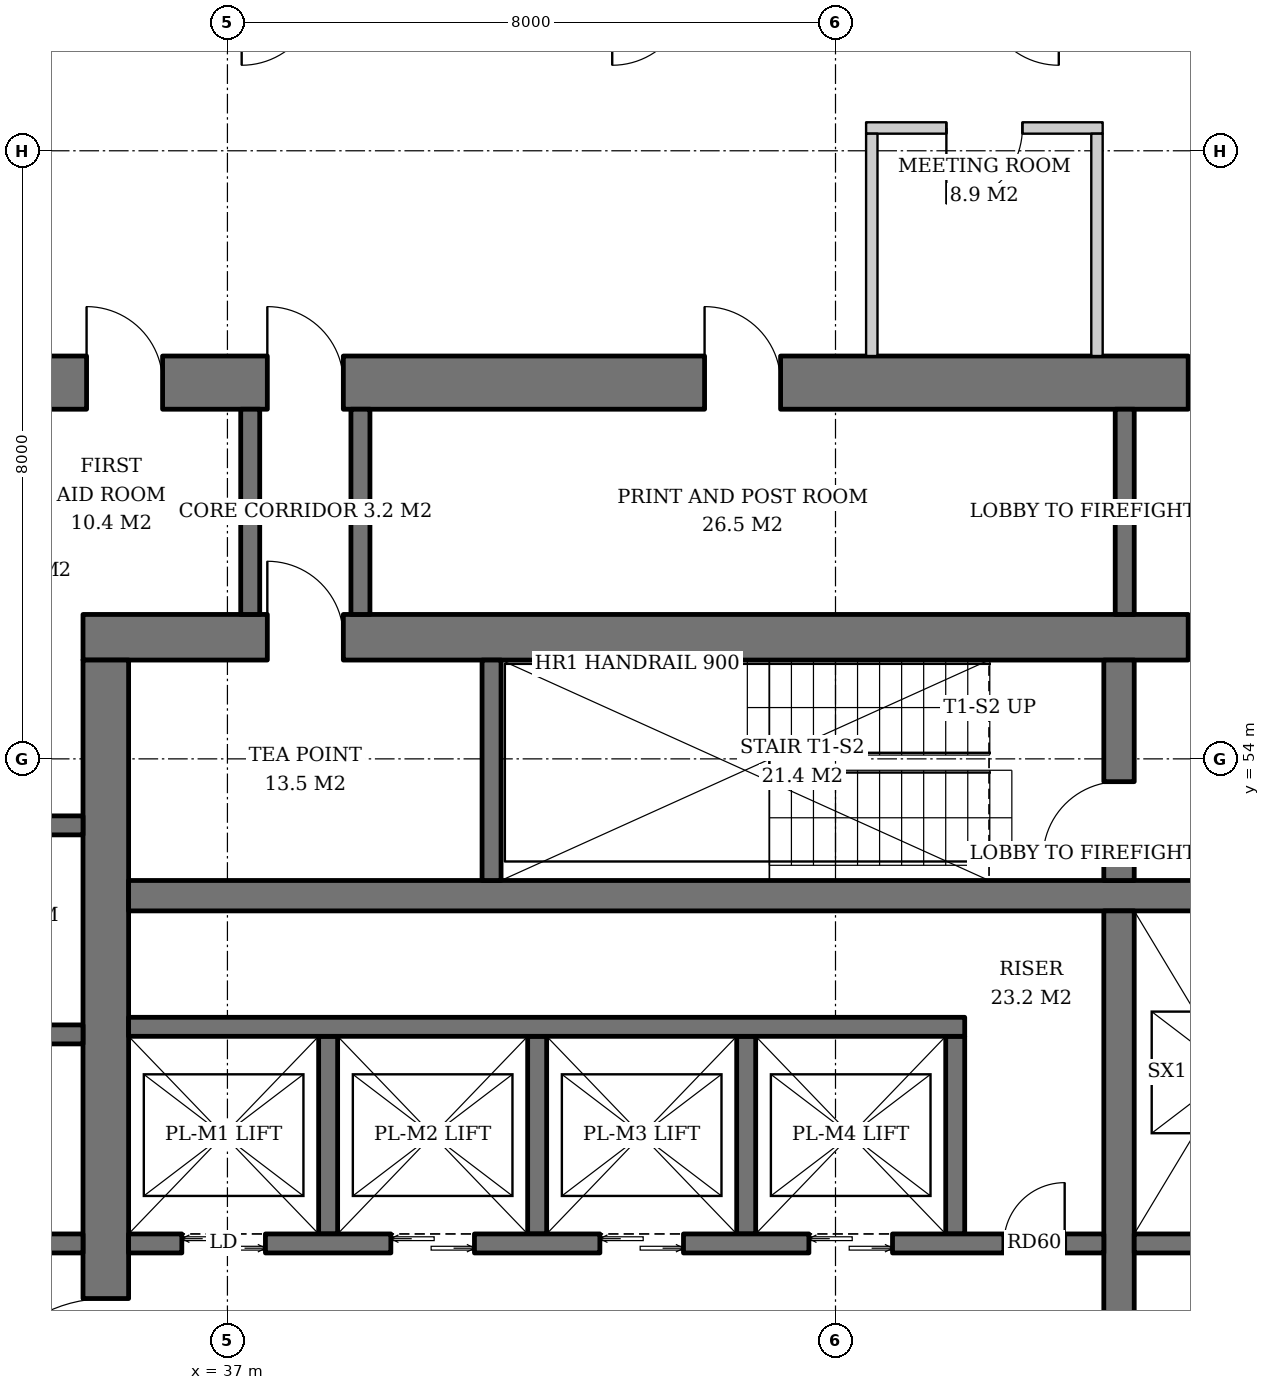
"""IFC4 building model, lengths in metres.
Left out: names, types, materials, properties, quantities, classifications, styles, units other than length and angle.
Written with IfcOpenShell. Run it as: python <this file> out.ifc"""

import sys

from ifc_helpers import new_model, si_unit, direction, frame, frame_2d, origin, place, context, subcontext, project, spatial, rectangle, extrude, element, fill, save


model = new_model("IFC4")
c1 = context("Model", 3, precision=1e-05, world=origin(), true_north=direction((0.0, 1.0)))
c2 = subcontext(c1, "Body", "Model", "MODEL_VIEW")
j1 = project(units=[si_unit("LENGTHUNIT", "METRE"), si_unit("PLANEANGLEUNIT", "RADIAN")], contexts=[c1])
p1 = place(None, origin())
s1 = spatial("IfcSite", under=j1, at=p1, CompositionType="ELEMENT")
p2 = place(p1, origin())
s2 = spatial("IfcBuilding", under=s1, at=p2, CompositionType="ELEMENT")
p3 = place(p2, frame((0.0, 0.0, 100.8)))
s3 = spatial("IfcBuildingStorey", under=s2, at=p3, CompositionType="ELEMENT", Elevation=100.8)
p4 = place(p3, frame((35.1, 55.6, 0.0), z_axis=(0.0, 0.0, 1.0), x_axis=(1.0, 0.0, 0.0)))
e1 = element("IfcWall", 1, at=p4, inside=s3, PredefinedType="SHEAR", context=c2, shape_type="SweptSolid", body=[
    extrude(rectangle(XDim=19.8, YDim=0.6, at=frame_2d((9.9, 0.0))), origin(), (0.0, 0.0, 1.0), 3.8),
])
p5 = place(p4, frame((14.54, 0.0, 0.0)))
e2 = element("IfcOpeningElement", 2, at=p5, cuts=e1, PredefinedType="OPENING", context=c2, shape_type="SweptSolid", body=[
    extrude(rectangle(XDim=1.0, YDim=2.1, at=frame_2d((0.5, 1.05))), frame((0.0, 0.31, 0.0), z_axis=(0.0, -1.0, 0.0), x_axis=(1.0, 0.0, 0.0)), (0.0, 0.0, 1.0), 0.62),
])
p6 = place(p4, frame((2.425, 0.0, 0.0)))
e3 = element("IfcOpeningElement", 3, at=p6, cuts=e1, PredefinedType="OPENING", context=c2, shape_type="SweptSolid", body=[
    extrude(rectangle(XDim=1.0, YDim=2.1, at=frame_2d((0.5, 1.05))), frame((0.0, 0.31, 0.0), z_axis=(0.0, -1.0, 0.0), x_axis=(1.0, 0.0, 0.0)), (0.0, 0.0, 1.0), 0.62),
])
p7 = place(p3, frame((35.4, 36.7, 0.0), z_axis=(0.0, 0.0, 1.0), x_axis=(0.0, 1.0, 0.0)))
e4 = element("IfcWall", 4, at=p7, inside=s3, PredefinedType="SHEAR", context=c2, shape_type="SweptSolid", body=[
    extrude(rectangle(XDim=18.6, YDim=0.6, at=frame_2d((9.3, 0.0))), origin(), (0.0, 0.0, 1.0), 3.8),
])
p8 = place(p7, frame((8.4, 0.0, 0.0)))
e5 = element("IfcOpeningElement", 5, at=p8, cuts=e4, PredefinedType="OPENING", context=c2, shape_type="SweptSolid", body=[
    extrude(rectangle(XDim=1.8, YDim=2.4, at=frame_2d((0.9, 1.2))), frame((0.0, 0.31, 0.0), z_axis=(0.0, -1.0, 0.0), x_axis=(1.0, 0.0, 0.0)), (0.0, 0.0, 1.0), 0.62),
])
p9 = place(p3, frame((31.7, 58.95, 0.0), z_axis=(0.0, 0.0, 1.0), x_axis=(1.0, 0.0, 0.0)))
e6 = element("IfcWall", 6, at=p9, inside=s3, PredefinedType="SHEAR", context=c2, shape_type="SweptSolid", body=[
    extrude(rectangle(XDim=26.6, YDim=0.7, at=frame_2d((13.3, 0.0))), origin(), (0.0, 0.0, 1.0), 3.8),
])
p10 = place(p9, frame((17.94, 0.0, 0.0)))
e7 = element("IfcOpeningElement", 7, at=p10, cuts=e6, PredefinedType="OPENING", context=c2, shape_type="SweptSolid", body=[
    extrude(rectangle(XDim=1.0, YDim=2.1, at=frame_2d((0.5, 1.05))), frame((0.0, 0.36, 0.0), z_axis=(0.0, -1.0, 0.0), x_axis=(1.0, 0.0, 0.0)), (0.0, 0.0, 1.0), 0.72),
])
p11 = place(p9, frame((5.825, 0.0, 0.0)))
e8 = element("IfcOpeningElement", 8, at=p11, cuts=e6, PredefinedType="OPENING", context=c2, shape_type="SweptSolid", body=[
    extrude(rectangle(XDim=1.0, YDim=2.1, at=frame_2d((0.5, 1.05))), frame((0.0, 0.36, 0.0), z_axis=(0.0, -1.0, 0.0), x_axis=(1.0, 0.0, 0.0)), (0.0, 0.0, 1.0), 0.72),
])
p12 = place(p9, frame((1.169, 0.0, 0.0)))
e9 = element("IfcOpeningElement", 9, at=p12, cuts=e6, PredefinedType="OPENING", context=c2, shape_type="SweptSolid", body=[
    extrude(rectangle(XDim=1.0, YDim=2.1, at=frame_2d((0.5, 1.05))), frame((0.0, 0.36, 0.0), z_axis=(0.0, -1.0, 0.0), x_axis=(1.0, 0.0, 0.0)), (0.0, 0.0, 1.0), 0.72),
])
p13 = place(p9, frame((3.447, 0.0, 0.0)))
e10 = element("IfcOpeningElement", 10, at=p13, cuts=e6, PredefinedType="OPENING", context=c2, shape_type="SweptSolid", body=[
    extrude(rectangle(XDim=1.0, YDim=2.1, at=frame_2d((0.5, 1.05))), frame((0.0, 0.36, 0.0), z_axis=(0.0, -1.0, 0.0), x_axis=(1.0, 0.0, 0.0)), (0.0, 0.0, 1.0), 0.72),
])
p14 = place(p9, frame((11.577, 0.0, 0.0)))
e11 = element("IfcOpeningElement", 11, at=p14, cuts=e6, PredefinedType="OPENING", context=c2, shape_type="SweptSolid", body=[
    extrude(rectangle(XDim=1.0, YDim=2.1, at=frame_2d((0.5, 1.05))), frame((0.0, 0.36, 0.0), z_axis=(0.0, -1.0, 0.0), x_axis=(1.0, 0.0, 0.0)), (0.0, 0.0, 1.0), 0.72),
])
p15 = place(p9, frame((20.9, 0.0, 0.0)))
e12 = element("IfcOpeningElement", 12, at=p15, cuts=e6, PredefinedType="OPENING", context=c2, shape_type="SweptSolid", body=[
    extrude(rectangle(XDim=1.0, YDim=2.1, at=frame_2d((0.5, 1.05))), frame((0.0, 0.36, 0.0), z_axis=(0.0, -1.0, 0.0), x_axis=(1.0, 0.0, 0.0)), (0.0, 0.0, 1.0), 0.72),
])
p16 = place(p9, frame((23.75, 0.0, 0.0)))
e13 = element("IfcOpeningElement", 13, at=p16, cuts=e6, PredefinedType="OPENING", context=c2, shape_type="SweptSolid", body=[
    extrude(rectangle(XDim=1.0, YDim=2.1, at=frame_2d((0.5, 1.05))), frame((0.0, 0.36, 0.0), z_axis=(0.0, -1.0, 0.0), x_axis=(1.0, 0.0, 0.0)), (0.0, 0.0, 1.0), 0.72),
])
p17 = place(p3, frame((35.7, 52.2, 0.0), z_axis=(0.0, 0.0, 1.0), x_axis=(1.0, 0.0, 0.0)))
e14 = element("IfcWall", 14, at=p17, inside=s3, PredefinedType="SHEAR", context=c2, shape_type="SweptSolid", body=[
    extrude(rectangle(XDim=18.6, YDim=0.4, at=frame_2d((9.3, 0.0))), origin(), (0.0, 0.0, 1.0), 3.8),
])
p18 = place(p3, frame((48.73, 40.0, 0.0), z_axis=(0.0, 0.0, 1.0), x_axis=(0.0, 1.0, 0.0)))
e15 = element("IfcWall", 15, at=p18, inside=s3, PredefinedType="SHEAR", context=c2, shape_type="SweptSolid", body=[
    extrude(rectangle(XDim=12.0, YDim=0.4, at=frame_2d((6.0, 0.0))), origin(), (0.0, 0.0, 1.0), 3.8),
])
p19 = place(p3, frame((48.73, 52.4, 0.0), z_axis=(0.0, 0.0, 1.0), x_axis=(0.0, 1.0, 0.0)))
e16 = element("IfcWall", 16, at=p19, inside=s3, PredefinedType="SHEAR", context=c2, shape_type="SweptSolid", body=[
    extrude(rectangle(XDim=2.9, YDim=0.4, at=frame_2d((1.45, 0.0))), origin(), (0.0, 0.0, 1.0), 3.8),
])
p20 = place(p19, frame((0.3, 0.0, 0.0)))
e17 = element("IfcOpeningElement", 17, at=p20, cuts=e16, PredefinedType="OPENING", context=c2, shape_type="SweptSolid", body=[
    extrude(rectangle(XDim=1.0, YDim=2.1, at=frame_2d((0.5, 1.05))), frame((0.0, 0.21, 0.0), z_axis=(0.0, -1.0, 0.0), x_axis=(1.0, 0.0, 0.0)), (0.0, 0.0, 1.0), 0.42),
])
p21 = place(p3, frame((40.475, 52.4, 0.0), z_axis=(0.0, 0.0, 1.0), x_axis=(0.0, 1.0, 0.0)))
e18 = element("IfcWall", 18, at=p21, inside=s3, PredefinedType="SHEAR", context=c2, shape_type="SweptSolid", body=[
    extrude(rectangle(XDim=2.9, YDim=0.25, at=frame_2d((1.45, 0.0))), origin(), (0.0, 0.0, 1.0), 3.8),
])
for number, where, z_axis, x_axis in (
    (19, (38.325, 47.75, 0.0), (0.0, 0.0, 1.0), (0.0, 1.0, 0.0)),
    (20, (41.075, 47.75, 0.0), (0.0, 0.0, 1.0), (0.0, 1.0, 0.0)),
    (21, (43.825, 47.75, 0.0), (0.0, 0.0, 1.0), (0.0, 1.0, 0.0)),
    (22, (46.575, 47.75, 0.0), (0.0, 0.0, 1.0), (0.0, 1.0, 0.0)),
):
    element("IfcWall", number, at=place(p3, frame(where, z_axis=z_axis, x_axis=x_axis)), inside=s3, PredefinedType="SHEAR", context=c2, shape_type="SweptSolid", body=[
        extrude(rectangle(XDim=2.6, YDim=0.25, at=frame_2d((1.3, 0.0))), origin(), (0.0, 0.0, 1.0), 3.8),
    ])
p22 = place(p3, frame((35.7, 50.475, 0.0), z_axis=(0.0, 0.0, 1.0), x_axis=(1.0, 0.0, 0.0)))
e23 = element("IfcWall", 23, at=p22, inside=s3, PredefinedType="SHEAR", context=c2, shape_type="SweptSolid", body=[
    extrude(rectangle(XDim=11.0, YDim=0.25, at=frame_2d((5.5, 0.0))), origin(), (0.0, 0.0, 1.0), 3.8),
])
p23 = place(p3, frame((35.7, 47.625, 0.0), z_axis=(0.0, 0.0, 1.0), x_axis=(1.0, 0.0, 0.0)))
e24 = element("IfcWall", 24, at=p23, inside=s3, PredefinedType="SHEAR", context=c2, shape_type="SweptSolid", body=[
    extrude(rectangle(XDim=12.83, YDim=0.25, at=frame_2d((6.415, 0.0))), origin(), (0.0, 0.0, 1.0), 3.8),
])
p24 = place(p23, frame((0.7, 0.0, 0.0)))
e25 = element("IfcOpeningElement", 25, at=p24, cuts=e24, PredefinedType="OPENING", context=c2, shape_type="SweptSolid", body=[
    extrude(rectangle(XDim=1.1, YDim=2.2, at=frame_2d((0.55, 1.1))), frame((0.0, 0.135, 0.0), z_axis=(0.0, -1.0, 0.0), x_axis=(1.0, 0.0, 0.0)), (0.0, 0.0, 1.0), 0.27),
])
p25 = place(p23, frame((3.45, 0.0, 0.0)))
e26 = element("IfcOpeningElement", 26, at=p25, cuts=e24, PredefinedType="OPENING", context=c2, shape_type="SweptSolid", body=[
    extrude(rectangle(XDim=1.1, YDim=2.2, at=frame_2d((0.55, 1.1))), frame((0.0, 0.135, 0.0), z_axis=(0.0, -1.0, 0.0), x_axis=(1.0, 0.0, 0.0)), (0.0, 0.0, 1.0), 0.27),
])
p26 = place(p23, frame((6.2, 0.0, 0.0)))
e27 = element("IfcOpeningElement", 27, at=p26, cuts=e24, PredefinedType="OPENING", context=c2, shape_type="SweptSolid", body=[
    extrude(rectangle(XDim=1.1, YDim=2.2, at=frame_2d((0.55, 1.1))), frame((0.0, 0.135, 0.0), z_axis=(0.0, -1.0, 0.0), x_axis=(1.0, 0.0, 0.0)), (0.0, 0.0, 1.0), 0.27),
])
p27 = place(p23, frame((8.95, 0.0, 0.0)))
e28 = element("IfcOpeningElement", 28, at=p27, cuts=e24, PredefinedType="OPENING", context=c2, shape_type="SweptSolid", body=[
    extrude(rectangle(XDim=1.1, YDim=2.2, at=frame_2d((0.55, 1.1))), frame((0.0, 0.135, 0.0), z_axis=(0.0, -1.0, 0.0), x_axis=(1.0, 0.0, 0.0)), (0.0, 0.0, 1.0), 0.27),
])
p28 = place(p23, frame((11.515, 0.0, 0.0)))
e29 = element("IfcOpeningElement", 29, at=p28, cuts=e24, PredefinedType="OPENING", context=c2, shape_type="SweptSolid", body=[
    extrude(rectangle(XDim=0.8, YDim=2.0, at=frame_2d((0.4, 1.0))), frame((0.0, 0.135, 0.0), z_axis=(0.0, -1.0, 0.0), x_axis=(1.0, 0.0, 0.0)), (0.0, 0.0, 1.0), 0.27),
])
p29 = place(p3, frame((48.93, 47.625, 0.0), z_axis=(0.0, 0.0, 1.0), x_axis=(1.0, 0.0, 0.0)))
e30 = element("IfcWall", 30, at=p29, inside=s3, PredefinedType="SHEAR", context=c2, shape_type="SweptSolid", body=[
    extrude(rectangle(XDim=5.37, YDim=0.25, at=frame_2d((2.685, 0.0))), origin(), (0.0, 0.0, 1.0), 3.8),
])
for number, where, z_axis, x_axis in (
    (31, (32.4, 47.625, 0.0), (0.0, 0.0, 1.0), (1.0, 0.0, 0.0)),
    (32, (32.4, 50.375, 0.0), (0.0, 0.0, 1.0), (1.0, 0.0, 0.0)),
    (33, (32.4, 53.125, 0.0), (0.0, 0.0, 1.0), (1.0, 0.0, 0.0)),
):
    element("IfcWall", number, at=place(p3, frame(where, z_axis=z_axis, x_axis=x_axis)), inside=s3, PredefinedType="SHEAR", context=c2, shape_type="SweptSolid", body=[
        extrude(rectangle(XDim=2.7, YDim=0.25, at=frame_2d((1.35, 0.0))), origin(), (0.0, 0.0, 1.0), 3.8),
    ])
for number, where, z_axis, x_axis in (
    (34, (48.805, 55.9, 0.0), (0.0, 0.0, 1.0), (0.0, 1.0, 0.0)),
    (35, (37.3, 55.9, 0.0), (0.0, 0.0, 1.0), (0.0, 1.0, 0.0)),
    (36, (38.75, 55.9, 0.0), (0.0, 0.0, 1.0), (0.0, 1.0, 0.0)),
):
    element("IfcWall", number, at=place(p3, frame(where, z_axis=z_axis, x_axis=x_axis)), inside=s3, PredefinedType="SOLIDWALL", context=c2, shape_type="SweptSolid", body=[
        extrude(rectangle(XDim=2.7, YDim=0.25, at=frame_2d((1.35, 0.0))), origin(), (0.0, 0.0, 1.0), 3.62),
    ])
p30 = place(p3, frame((48.515, 62.3, 0.0), z_axis=(0.0, 0.0, 1.0), x_axis=(-1.0, 0.0, 0.0)))
e37 = element("IfcWall", 37, at=p30, inside=s3, PredefinedType="PARTITIONING", context=c2, shape_type="SweptSolid", body=[
    extrude(rectangle(XDim=3.112, YDim=0.15, at=frame_2d((1.556, 0.0))), origin(), (0.0, 0.0, 1.0), 3.62),
])
p31 = place(p30, frame((1.056, 0.0, 0.0)))
e38 = element("IfcOpeningElement", 38, at=p31, cuts=e37, PredefinedType="OPENING", context=c2, shape_type="SweptSolid", body=[
    extrude(rectangle(XDim=1.0, YDim=2.1, at=frame_2d((0.5, 1.05))), frame((0.0, 0.085, 0.0), z_axis=(0.0, -1.0, 0.0), x_axis=(1.0, 0.0, 0.0)), (0.0, 0.0, 1.0), 0.17),
])
for number, where, z_axis, x_axis in (
    (39, (48.44, 59.3, 0.0), (0.0, 0.0, 1.0), (0.0, 1.0, 0.0)),
    (40, (45.478, 59.3, 0.0), (0.0, 0.0, 1.0), (0.0, 1.0, 0.0)),
):
    element("IfcWall", number, at=place(p3, frame(where, z_axis=z_axis, x_axis=x_axis)), inside=s3, PredefinedType="PARTITIONING", context=c2, shape_type="SweptSolid", body=[
        extrude(rectangle(XDim=2.925, YDim=0.15, at=frame_2d((1.462, 0.0))), origin(), (0.0, 0.0, 1.0), 3.62),
    ])
p32 = place(p24, origin())
e41 = element("IfcDoor", 41, at=p32, inside=s3, OperationType="DOUBLE_DOOR_SLIDING", PredefinedType="DOOR", context=c2, shape_type="SweptSolid", body=[
    extrude(rectangle(XDim=1.1, YDim=2.2, at=frame_2d((0.55, 1.1))), frame((0.0, 0.025, 0.0), z_axis=(0.0, -1.0, 0.0), x_axis=(1.0, 0.0, 0.0)), (0.0, 0.0, 1.0), 0.05),
])
fill(e25, e41)
p33 = place(p25, origin())
e42 = element("IfcDoor", 42, at=p33, inside=s3, OperationType="DOUBLE_DOOR_SLIDING", PredefinedType="DOOR", context=c2, shape_type="SweptSolid", body=[
    extrude(rectangle(XDim=1.1, YDim=2.2, at=frame_2d((0.55, 1.1))), frame((0.0, 0.025, 0.0), z_axis=(0.0, -1.0, 0.0), x_axis=(1.0, 0.0, 0.0)), (0.0, 0.0, 1.0), 0.05),
])
fill(e26, e42)
p34 = place(p26, origin())
e43 = element("IfcDoor", 43, at=p34, inside=s3, OperationType="DOUBLE_DOOR_SLIDING", PredefinedType="DOOR", context=c2, shape_type="SweptSolid", body=[
    extrude(rectangle(XDim=1.1, YDim=2.2, at=frame_2d((0.55, 1.1))), frame((0.0, 0.025, 0.0), z_axis=(0.0, -1.0, 0.0), x_axis=(1.0, 0.0, 0.0)), (0.0, 0.0, 1.0), 0.05),
])
fill(e27, e43)
p35 = place(p27, origin())
e44 = element("IfcDoor", 44, at=p35, inside=s3, OperationType="DOUBLE_DOOR_SLIDING", PredefinedType="DOOR", context=c2, shape_type="SweptSolid", body=[
    extrude(rectangle(XDim=1.1, YDim=2.2, at=frame_2d((0.55, 1.1))), frame((0.0, 0.025, 0.0), z_axis=(0.0, -1.0, 0.0), x_axis=(1.0, 0.0, 0.0)), (0.0, 0.0, 1.0), 0.05),
])
fill(e28, e44)
p36 = place(p28, origin())
e45 = element("IfcDoor", 45, at=p36, inside=s3, OperationType="SINGLE_SWING_RIGHT", PredefinedType="DOOR", context=c2, shape_type="SweptSolid", body=[
    extrude(rectangle(XDim=0.8, YDim=2.0, at=frame_2d((0.4, 1.0))), frame((0.0, 0.025, 0.0), z_axis=(0.0, -1.0, 0.0), x_axis=(1.0, 0.0, 0.0)), (0.0, 0.0, 1.0), 0.05),
])
fill(e29, e45)
p37 = place(p20, origin())
e46 = element("IfcDoor", 46, at=p37, inside=s3, OperationType="SINGLE_SWING_LEFT", PredefinedType="DOOR", context=c2, shape_type="SweptSolid", body=[
    extrude(rectangle(XDim=1.0, YDim=2.1, at=frame_2d((0.5, 1.05))), frame((0.0, 0.025, 0.0), z_axis=(0.0, -1.0, 0.0), x_axis=(1.0, 0.0, 0.0)), (0.0, 0.0, 1.0), 0.05),
])
fill(e17, e46)
p38 = place(p5, origin())
e47 = element("IfcDoor", 47, at=p38, inside=s3, OperationType="SINGLE_SWING_RIGHT", PredefinedType="DOOR", context=c2, shape_type="SweptSolid", body=[
    extrude(rectangle(XDim=1.0, YDim=2.1, at=frame_2d((0.5, 1.05))), frame((0.0, 0.025, 0.0), z_axis=(0.0, -1.0, 0.0), x_axis=(1.0, 0.0, 0.0)), (0.0, 0.0, 1.0), 0.05),
])
fill(e2, e47)
p39 = place(p8, origin())
e48 = element("IfcDoor", 48, at=p39, inside=s3, OperationType="DOUBLE_DOOR_SINGLE_SWING", PredefinedType="DOOR", context=c2, shape_type="SweptSolid", body=[
    extrude(rectangle(XDim=1.8, YDim=2.4, at=frame_2d((0.9, 1.2))), frame((0.0, 0.025, 0.0), z_axis=(0.0, -1.0, 0.0), x_axis=(1.0, 0.0, 0.0)), (0.0, 0.0, 1.0), 0.05),
])
fill(e5, e48)
p40 = place(p10, origin())
e49 = element("IfcDoor", 49, at=p40, inside=s3, OperationType="SINGLE_SWING_RIGHT", PredefinedType="DOOR", context=c2, shape_type="SweptSolid", body=[
    extrude(rectangle(XDim=1.0, YDim=2.1, at=frame_2d((0.5, 1.05))), frame((0.0, 0.025, 0.0), z_axis=(0.0, -1.0, 0.0), x_axis=(1.0, 0.0, 0.0)), (0.0, 0.0, 1.0), 0.05),
])
fill(e7, e49)
p41 = place(p11, origin())
e50 = element("IfcDoor", 50, at=p41, inside=s3, OperationType="SINGLE_SWING_LEFT", PredefinedType="DOOR", context=c2, shape_type="SweptSolid", body=[
    extrude(rectangle(XDim=1.0, YDim=2.1, at=frame_2d((0.5, 1.05))), frame((0.0, 0.025, 0.0), z_axis=(0.0, -1.0, 0.0), x_axis=(1.0, 0.0, 0.0)), (0.0, 0.0, 1.0), 0.05),
])
fill(e8, e50)
p42 = place(p6, origin())
e51 = element("IfcDoor", 51, at=p42, inside=s3, OperationType="SINGLE_SWING_LEFT", PredefinedType="DOOR", context=c2, shape_type="SweptSolid", body=[
    extrude(rectangle(XDim=1.0, YDim=2.1, at=frame_2d((0.5, 1.05))), frame((0.0, -0.24, 0.0), z_axis=(0.0, -1.0, 0.0), x_axis=(1.0, 0.0, 0.0)), (0.0, 0.0, 1.0), 0.05),
])
fill(e3, e51)
p43 = place(p13, origin())
e52 = element("IfcDoor", 52, at=p43, inside=s3, OperationType="SINGLE_SWING_LEFT", PredefinedType="DOOR", context=c2, shape_type="SweptSolid", body=[
    extrude(rectangle(XDim=1.0, YDim=2.1, at=frame_2d((0.5, 1.05))), frame((0.0, -0.29, 0.0), z_axis=(0.0, -1.0, 0.0), x_axis=(1.0, 0.0, 0.0)), (0.0, 0.0, 1.0), 0.05),
])
fill(e10, e52)
p44 = place(p14, origin())
e53 = element("IfcDoor", 53, at=p44, inside=s3, OperationType="SINGLE_SWING_LEFT", PredefinedType="DOOR", context=c2, shape_type="SweptSolid", body=[
    extrude(rectangle(XDim=1.0, YDim=2.1, at=frame_2d((0.5, 1.05))), frame((0.0, -0.29, 0.0), z_axis=(0.0, -1.0, 0.0), x_axis=(1.0, 0.0, 0.0)), (0.0, 0.0, 1.0), 0.05),
])
fill(e11, e53)
p45 = place(p31, origin())
e54 = element("IfcDoor", 54, at=p45, inside=s3, OperationType="SINGLE_SWING_RIGHT", PredefinedType="DOOR", context=c2, shape_type="SweptSolid", body=[
    extrude(rectangle(XDim=1.0, YDim=2.1, at=frame_2d((0.5, 1.05))), frame((0.0, 0.025, 0.0), z_axis=(0.0, -1.0, 0.0), x_axis=(1.0, 0.0, 0.0)), (0.0, 0.0, 1.0), 0.05),
])
fill(e38, e54)
save(model, sys.argv[1])
